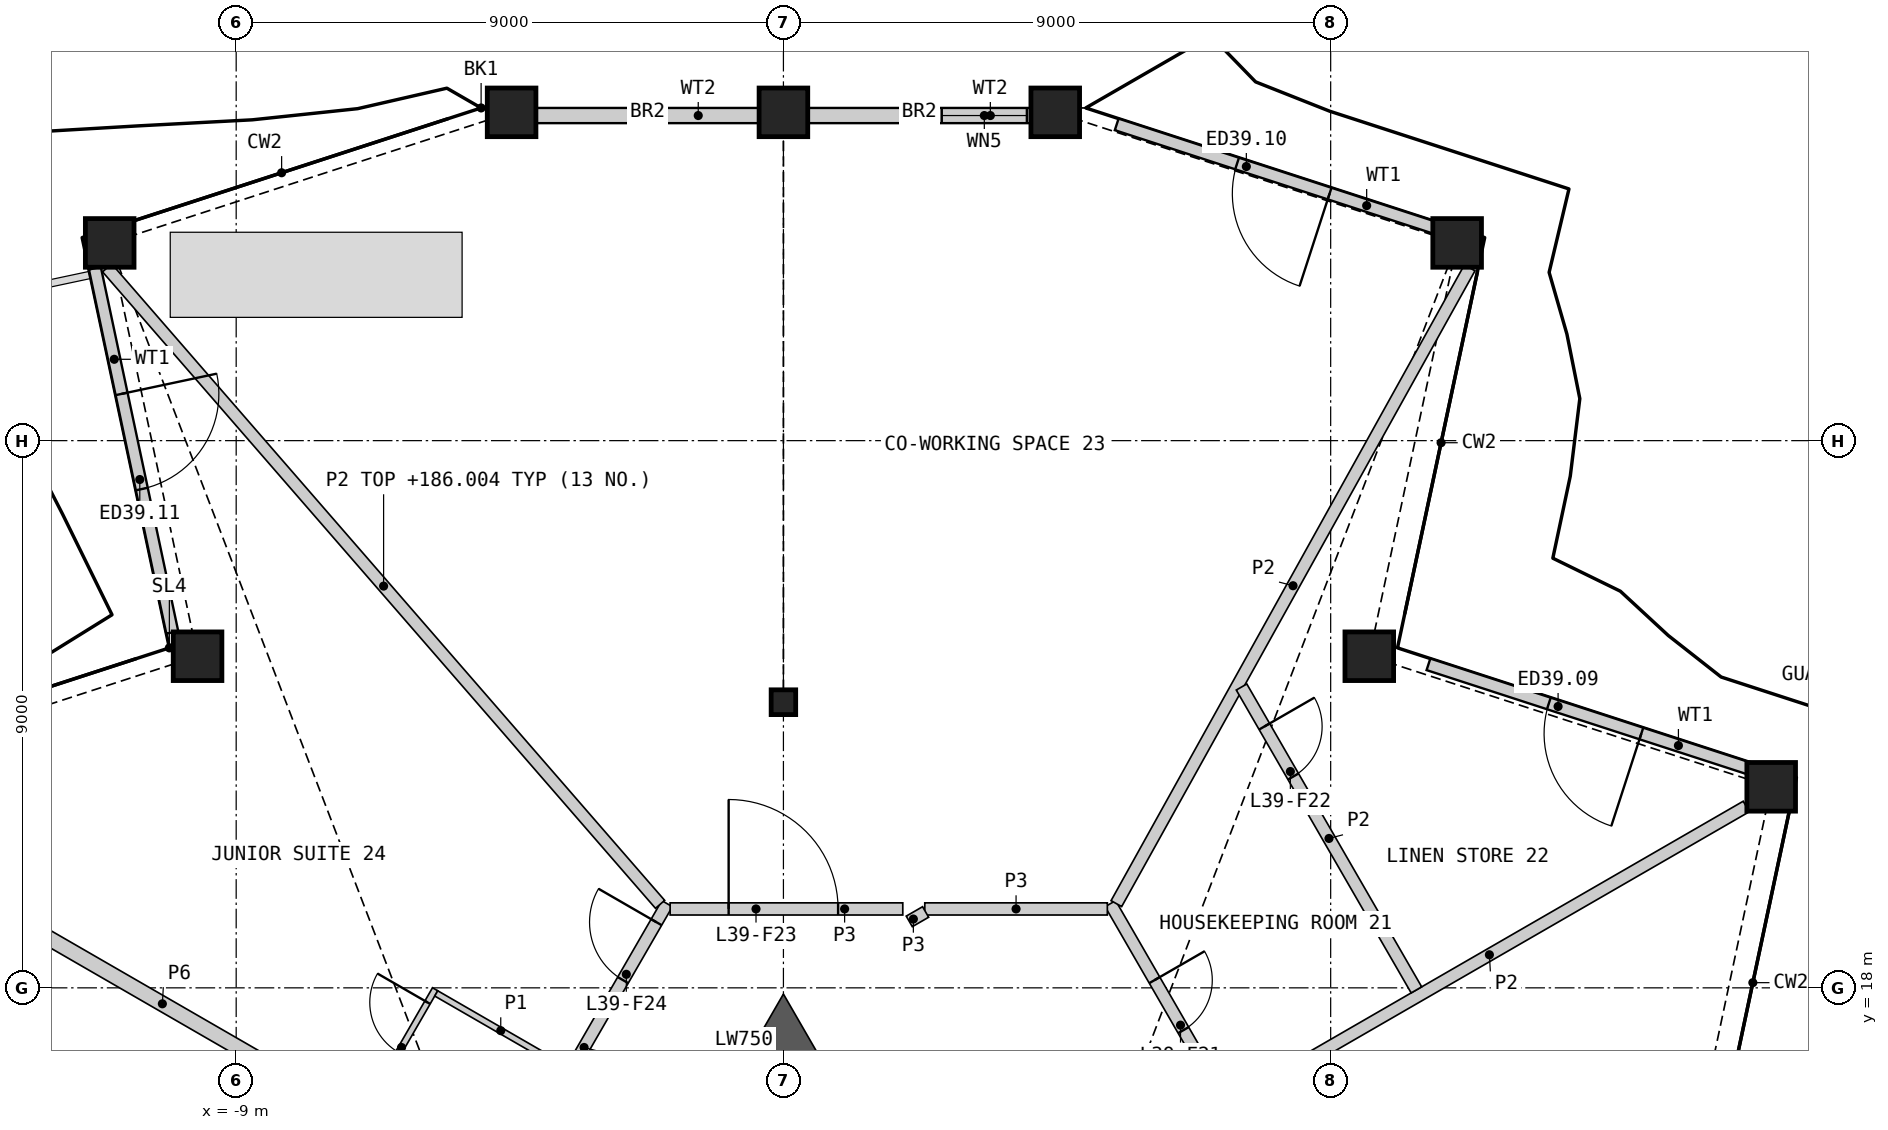
"""IFC4 building model, lengths in metres.
Left out: names, types, materials, properties, quantities, classifications, styles, units other than length and angle.
Written with IfcOpenShell. Run it as: python <this file> out.ifc"""

import sys

from ifc_helpers import new_model, si_unit, direction, frame, frame_2d, origin, origin_2d, place, context, subcontext, project, spatial, polyline, rectangle, hollow_rectangle, i_section, outline, extrude, element, fill, save


model = new_model("IFC4")
c1 = context("Model", 3, precision=1e-05, world=origin(), true_north=direction((0.0, 1.0)))
c2 = subcontext(c1, "Body", "Model", "MODEL_VIEW")
j1 = project(units=[si_unit("LENGTHUNIT", "METRE"), si_unit("PLANEANGLEUNIT", "RADIAN")], contexts=[c1])
p1 = place(None, origin())
s1 = spatial("IfcSite", under=j1, at=p1, CompositionType="ELEMENT")
p2 = place(p1, origin())
s2 = spatial("IfcBuilding", under=s1, at=p2, CompositionType="ELEMENT")
p3 = place(p2, frame((0.0, 0.0, 183.6)))
s3 = spatial("IfcBuildingStorey", under=s2, at=p3, CompositionType="ELEMENT", Elevation=183.6)
for number, where, z_axis, x_axis in (
    (1, (16.245, 21.306, 0.0), (0.0, 0.0, 1.0), (1.0, 0.0, 0.0)),
    (2, (9.635, 23.454, 0.0), (0.0, 0.0, 1.0), (1.0, 0.0, 0.0)),
    (3, (11.08, 30.252, 0.0), (0.0, 0.0, 1.0), (1.0, 0.0, 0.0)),
    (4, (4.47, 32.399, 0.0), (0.0, 0.0, 1.0), (1.0, 0.0, 0.0)),
    (5, (0.0, 32.399, 0.0), (0.0, 0.0, 1.0), (1.0, 0.0, 0.0)),
    (6, (-4.47, 32.399, 0.0), (0.0, 0.0, 1.0), (1.0, 0.0, 0.0)),
    (7, (-11.08, 30.252, 0.0), (0.0, 0.0, 1.0), (1.0, 0.0, 0.0)),
    (8, (-9.635, 23.454, 0.0), (0.0, 0.0, 1.0), (1.0, 0.0, 0.0)),
):
    element("IfcColumn", number, at=place(p3, frame(where, z_axis=z_axis, x_axis=x_axis)), inside=s3, PredefinedType="COLUMN", context=c2, shape_type="SweptSolid", body=[
        extrude(hollow_rectangle(XDim=0.8, YDim=0.8, WallThickness=0.05, at=origin_2d()), origin(), (0.0, 0.0, 1.0), 3.6),
    ])
p4 = place(p3, frame((0.0, 22.698, 0.0), z_axis=(0.0, 0.0, 1.0), x_axis=(1.0, 0.0, 0.0)))
e9 = element("IfcColumn", 9, at=p4, inside=s3, PredefinedType="COLUMN", context=c2, shape_type="SweptSolid", body=[
    extrude(i_section(OverallWidth=0.404, OverallDepth=0.407, WebThickness=0.027, FlangeThickness=0.044, at=origin_2d()), origin(), (0.0, 0.0, 1.0), 3.6),
])
p5 = place(p3, frame((16.089, 21.54, 0.0), z_axis=(0.0, 0.0, 1.0), x_axis=(-0.951053678976, 0.30902572661, 0.0)))
e10 = element("IfcWall", 10, at=p5, inside=s3, PredefinedType="SOLIDWALL", context=c2, shape_type="SweptSolid", body=[
    extrude(rectangle(XDim=5.763, YDim=0.2, at=frame_2d((2.882, 0.0))), origin(), (0.0, 0.0, 1.0), 2.701),
])
p6 = place(p5, frame((2.082, 0.0, 0.0)))
e11 = element("IfcOpeningElement", 11, at=p6, cuts=e10, PredefinedType="OPENING", context=c2, shape_type="SweptSolid", body=[
    extrude(rectangle(XDim=1.6, YDim=2.4, at=frame_2d((0.8, 1.2))), frame((0.0, 0.11, 0.0), z_axis=(0.0, -1.0, 0.0), x_axis=(1.0, 0.0, 0.0)), (0.0, 0.0, 1.0), 0.22),
])
p7 = place(p3, frame((10.962, 30.42, 0.0), z_axis=(0.0, 0.0, 1.0), x_axis=(-0.951062083689, 0.308999859173, 0.0)))
e12 = element("IfcWall", 12, at=p7, inside=s3, PredefinedType="SOLIDWALL", context=c2, shape_type="SweptSolid", body=[
    extrude(rectangle(XDim=5.763, YDim=0.2, at=frame_2d((2.881, 0.0))), origin(), (0.0, 0.0, 1.0), 2.701),
])
p8 = place(p7, frame((2.082, 0.0, 0.0)))
e13 = element("IfcOpeningElement", 13, at=p8, cuts=e12, PredefinedType="OPENING", context=c2, shape_type="SweptSolid", body=[
    extrude(rectangle(XDim=1.6, YDim=2.4, at=frame_2d((0.8, 1.2))), frame((0.0, 0.11, 0.0), z_axis=(0.0, -1.0, 0.0), x_axis=(1.0, 0.0, 0.0)), (0.0, 0.0, 1.0), 0.22),
])
p9 = place(p3, frame((4.404, 32.347, 0.0), z_axis=(0.0, 0.0, 1.0), x_axis=(-1.0, 0.0, 0.0)))
e14 = element("IfcWall", 14, at=p9, inside=s3, PredefinedType="SOLIDWALL", context=c2, shape_type="SweptSolid", body=[
    extrude(rectangle(XDim=4.004, YDim=0.25, at=frame_2d((2.002, 0.0))), origin(), (0.0, 0.0, 1.0), 2.701),
])
p10 = place(p9, frame((0.4, 0.0, 1.6)))
e15 = element("IfcOpeningElement", 15, at=p10, cuts=e14, PredefinedType="OPENING", context=c2, shape_type="SweptSolid", body=[
    extrude(rectangle(XDim=1.4, YDim=0.9, at=frame_2d((0.7, 0.45))), frame((0.0, 0.135, 0.0), z_axis=(0.0, -1.0, 0.0), x_axis=(1.0, 0.0, 0.0)), (0.0, 0.0, 1.0), 0.27),
])
p11 = place(p3, frame((-0.4, 32.347, 0.0), z_axis=(0.0, 0.0, 1.0), x_axis=(-1.0, 0.0, 0.0)))
e16 = element("IfcWall", 16, at=p11, inside=s3, PredefinedType="SOLIDWALL", context=c2, shape_type="SweptSolid", body=[
    extrude(rectangle(XDim=4.004, YDim=0.25, at=frame_2d((2.002, 0.0))), origin(), (0.0, 0.0, 1.0), 2.701),
])
p12 = place(p3, frame((-11.324, 29.835, 0.0), z_axis=(0.0, 0.0, 1.0), x_axis=(0.207925037413, -0.978144763732, 0.0)))
e17 = element("IfcWall", 17, at=p12, inside=s3, PredefinedType="SOLIDWALL", context=c2, shape_type="SweptSolid", body=[
    extrude(rectangle(XDim=6.123, YDim=0.2, at=frame_2d((3.062, 0.0))), origin(), (0.0, 0.0, 1.0), 2.701),
])
p13 = place(p12, frame((2.113, 0.0, 0.0)))
e18 = element("IfcOpeningElement", 18, at=p13, cuts=e17, PredefinedType="OPENING", context=c2, shape_type="SweptSolid", body=[
    extrude(rectangle(XDim=1.6, YDim=2.4, at=frame_2d((0.8, 1.2))), frame((0.0, 0.11, 0.0), z_axis=(0.0, -1.0, 0.0), x_axis=(1.0, 0.0, 0.0)), (0.0, 0.0, 1.0), 0.22),
])
p14 = place(p3, origin())
e19 = element("IfcWall", 19, at=p14, inside=s3, PredefinedType="SHEAR", context=c2, shape_type="SweptSolid", body=[
    extrude(outline(polyline([(-0.649, 16.773), (0.0, 17.898), (0.649, 16.773), (0.0, 16.398), (-0.649, 16.773)])), origin(), (0.0, 0.0, 1.0), 3.25),
])
p15 = place(p3, frame((5.377, 19.385, 0.0), z_axis=(0.0, 0.0, 1.0), x_axis=(0.500000757641, -0.86602496636, 0.0)))
e20 = element("IfcWall", 20, at=p15, inside=s3, PredefinedType="PARTITIONING", context=c2, shape_type="SweptSolid", body=[
    extrude(rectangle(XDim=28.198, YDim=0.2, at=frame_2d((14.099, 0.0))), origin(), (0.0, 0.0, 1.0), 3.25),
])
p16 = place(p15, frame((22.735, 0.0, 0.0)))
e21 = element("IfcOpeningElement", 21, at=p16, cuts=e20, PredefinedType="OPENING", context=c2, shape_type="SweptSolid", body=[
    extrude(rectangle(XDim=1.8, YDim=2.1, at=frame_2d((0.9, 1.05))), frame((0.0, 0.11, 0.0), z_axis=(0.0, -1.0, 0.0), x_axis=(1.0, 0.0, 0.0)), (0.0, 0.0, 1.0), 0.22),
])
p17 = place(p15, frame((14.402, 0.0, 0.0)))
e22 = element("IfcOpeningElement", 22, at=p17, cuts=e20, PredefinedType="OPENING", context=c2, shape_type="SweptSolid", body=[
    extrude(rectangle(XDim=1.0, YDim=2.1, at=frame_2d((0.5, 1.05))), frame((0.0, 0.11, 0.0), z_axis=(0.0, -1.0, 0.0), x_axis=(1.0, 0.0, 0.0)), (0.0, 0.0, 1.0), 0.22),
])
p18 = place(p15, frame((12.796, 0.0, 0.0)))
e23 = element("IfcOpeningElement", 23, at=p18, cuts=e20, PredefinedType="OPENING", context=c2, shape_type="SweptSolid", body=[
    extrude(rectangle(XDim=1.0, YDim=2.1, at=frame_2d((0.5, 1.05))), frame((0.0, 0.11, 0.0), z_axis=(0.0, -1.0, 0.0), x_axis=(1.0, 0.0, 0.0)), (0.0, 0.0, 1.0), 0.22),
])
p19 = place(p15, frame((4.164, 0.0, 0.0)))
e24 = element("IfcOpeningElement", 24, at=p19, cuts=e20, PredefinedType="OPENING", context=c2, shape_type="SweptSolid", body=[
    extrude(rectangle(XDim=1.0, YDim=2.1, at=frame_2d((0.5, 1.05))), frame((0.0, 0.11, 0.0), z_axis=(0.0, -1.0, 0.0), x_axis=(1.0, 0.0, 0.0)), (0.0, 0.0, 1.0), 0.22),
])
p20 = place(p15, frame((1.452, 0.0, 0.0)))
e25 = element("IfcOpeningElement", 25, at=p20, cuts=e20, PredefinedType="OPENING", context=c2, shape_type="SweptSolid", body=[
    extrude(rectangle(XDim=0.95, YDim=2.1, at=frame_2d((0.475, 1.05))), frame((0.0, 0.11, 0.0), z_axis=(0.0, -1.0, 0.0), x_axis=(1.0, 0.0, 0.0)), (0.0, 0.0, 1.0), 0.22),
])
p21 = place(p3, frame((-15.835, 20.983, 0.0), z_axis=(0.0, 0.0, 1.0), x_axis=(0.866022720283, -0.500004647933, 0.0)))
e26 = element("IfcWall", 26, at=p21, inside=s3, PredefinedType="PARTITIONING", context=c2, shape_type="SweptSolid", body=[
    extrude(rectangle(XDim=12.981, YDim=0.25, at=frame_2d((6.49, 0.0))), origin(), (0.0, 0.0, 1.0), 2.404),
])
p22 = place(p3, frame((-4.644, 14.655, 0.0), z_axis=(0.0, 0.0, 1.0), x_axis=(0.49998041698, 0.866036709751, 0.0)))
e27 = element("IfcWall", 27, at=p22, inside=s3, PredefinedType="PARTITIONING", context=c2, shape_type="SweptSolid", body=[
    extrude(rectangle(XDim=5.462, YDim=0.2, at=frame_2d((2.731, 0.0))), origin(), (0.0, 0.0, 1.0), 3.25),
])
p23 = place(p22, frame((4.01, 0.0, 0.0)))
e28 = element("IfcOpeningElement", 28, at=p23, cuts=e27, PredefinedType="OPENING", context=c2, shape_type="SweptSolid", body=[
    extrude(rectangle(XDim=1.1, YDim=2.1, at=frame_2d((0.55, 1.05))), frame((0.0, 0.11, 0.0), z_axis=(0.0, -1.0, 0.0), x_axis=(1.0, 0.0, 0.0)), (0.0, 0.0, 1.0), 0.22),
])
p24 = place(p3, frame((-1.863, 19.298, 0.0), z_axis=(0.0, 0.0, 1.0), x_axis=(1.0, 0.0, 0.0)))
e29 = element("IfcWall", 29, at=p24, inside=s3, PredefinedType="PARTITIONING", context=c2, shape_type="SweptSolid", body=[
    extrude(rectangle(XDim=3.826, YDim=0.2, at=frame_2d((1.913, 0.0))), origin(), (0.0, 0.0, 1.0), 3.25),
])
p25 = place(p24, frame((0.962, 0.0, 0.0)))
e30 = element("IfcOpeningElement", 30, at=p25, cuts=e29, PredefinedType="OPENING", context=c2, shape_type="SweptSolid", body=[
    extrude(rectangle(XDim=1.8, YDim=2.1, at=frame_2d((0.9, 1.05))), frame((0.0, 0.11, 0.0), z_axis=(0.0, -1.0, 0.0), x_axis=(1.0, 0.0, 0.0)), (0.0, 0.0, 1.0), 0.22),
])
p26 = place(p3, frame((2.325, 19.298, 0.0), z_axis=(0.0, 0.0, 1.0), x_axis=(1.0, 0.0, 0.0)))
e31 = element("IfcWall", 31, at=p26, inside=s3, PredefinedType="PARTITIONING", context=c2, shape_type="SweptSolid", body=[
    extrude(rectangle(XDim=3.002, YDim=0.2, at=frame_2d((1.501, 0.0))), origin(), (0.0, 0.0, 1.0), 3.25),
])
p27 = place(p3, frame((2.07, 19.093, 0.0), z_axis=(0.0, 0.0, 1.0), x_axis=(0.866395311824, 0.499358752451, 0.0)))
e32 = element("IfcWall", 32, at=p27, inside=s3, PredefinedType="PARTITIONING", context=c2, shape_type="SweptSolid", body=[
    extrude(rectangle(XDim=0.31, YDim=0.2, at=frame_2d((0.155, 0.0))), origin(), (0.0, 0.0, 1.0), 3.25),
])
p28 = place(p3, frame((-11.122, 29.842, 0.0), z_axis=(0.0, 0.0, 1.0), x_axis=(0.65579678992, -0.754937461205, 0.0)))
e33 = element("IfcWall", 33, at=p28, inside=s3, PredefinedType="PARTITIONING", context=c2, shape_type="SweptSolid", body=[
    extrude(rectangle(XDim=13.867, YDim=0.2, at=frame_2d((6.933, 0.0))), origin(), (0.0, 0.0, 1.0), 2.404),
])
p29 = place(p3, frame((5.476, 19.385, 0.0), z_axis=(0.0, 0.0, 1.0), x_axis=(0.485729569949, 0.874109137853, 0.0)))
e34 = element("IfcWall", 34, at=p29, inside=s3, PredefinedType="PARTITIONING", context=c2, shape_type="SweptSolid", body=[
    extrude(rectangle(XDim=11.962, YDim=0.2, at=frame_2d((5.981, 0.0))), origin(), (0.0, 0.0, 1.0), 2.404),
])
p30 = place(p3, frame((7.386, 16.105, 0.0), z_axis=(0.0, 0.0, 1.0), x_axis=(0.866023056814, 0.500004065051, 0.0)))
e35 = element("IfcWall", 35, at=p30, inside=s3, PredefinedType="PARTITIONING", context=c2, shape_type="SweptSolid", body=[
    extrude(rectangle(XDim=9.756, YDim=0.2, at=frame_2d((4.878, 0.0))), origin(), (0.0, 0.0, 1.0), 2.404),
])
p31 = place(p3, frame((7.534, 22.948, 0.0), z_axis=(0.0, 0.0, 1.0), x_axis=(0.499991885958, -0.866030088378, 0.0)))
e36 = element("IfcWall", 36, at=p31, inside=s3, PredefinedType="PARTITIONING", context=c2, shape_type="SweptSolid", body=[
    extrude(rectangle(XDim=5.752, YDim=0.2, at=frame_2d((2.876, 0.0))), origin(), (0.0, 0.0, 1.0), 2.404),
])
p32 = place(p31, frame((0.75, 0.0, 0.0)))
e37 = element("IfcOpeningElement", 37, at=p32, cuts=e36, PredefinedType="OPENING", context=c2, shape_type="SweptSolid", body=[
    extrude(rectangle(XDim=0.95, YDim=2.1, at=frame_2d((0.475, 1.05))), frame((0.0, 0.11, 0.0), z_axis=(0.0, -1.0, 0.0), x_axis=(1.0, 0.0, 0.0)), (0.0, 0.0, 1.0), 0.22),
])
p33 = place(p3, frame((-8.328, 13.473, 0.0), z_axis=(0.0, 0.0, 1.0), x_axis=(0.499992051641, 0.866029992723, 0.0)))
e38 = element("IfcWall", 38, at=p33, inside=s3, PredefinedType="PARTITIONING", context=c2, shape_type="SweptSolid", body=[
    extrude(rectangle(XDim=5.2, YDim=0.1, at=frame_2d((2.6, 0.0))), origin(), (0.0, 0.0, 1.0), 2.404),
])
p34 = place(p33, frame((4.0, 0.0, 0.0)))
e39 = element("IfcOpeningElement", 39, at=p34, cuts=e38, PredefinedType="OPENING", context=c2, shape_type="SweptSolid", body=[
    extrude(rectangle(XDim=0.95, YDim=2.1, at=frame_2d((0.475, 1.05))), frame((0.0, 0.06, 0.0), z_axis=(0.0, -1.0, 0.0), x_axis=(1.0, 0.0, 0.0)), (0.0, 0.0, 1.0), 0.12),
])
p35 = place(p33, frame((0.25, 0.0, 0.0)))
e40 = element("IfcOpeningElement", 40, at=p35, cuts=e38, PredefinedType="OPENING", context=c2, shape_type="SweptSolid", body=[
    extrude(rectangle(XDim=0.95, YDim=2.1, at=frame_2d((0.475, 1.05))), frame((0.0, 0.06, 0.0), z_axis=(0.0, -1.0, 0.0), x_axis=(1.0, 0.0, 0.0)), (0.0, 0.0, 1.0), 0.12),
])
p36 = place(p3, frame((-5.71, 17.908, 0.0), z_axis=(0.0, 0.0, 1.0), x_axis=(0.866057815567, -0.499943856944, 0.0)))
e41 = element("IfcWall", 41, at=p36, inside=s3, PredefinedType="PARTITIONING", context=c2, shape_type="SweptSolid", body=[
    extrude(rectangle(XDim=2.45, YDim=0.1, at=frame_2d((1.225, 0.0))), origin(), (0.0, 0.0, 1.0), 2.404),
])
p37 = place(p6, origin())
e42 = element("IfcDoor", 42, at=p37, inside=s3, OperationType="DOUBLE_DOOR_SINGLE_SWING", PredefinedType="DOOR", context=c2, shape_type="SweptSolid", body=[
    extrude(rectangle(XDim=1.6, YDim=2.4, at=frame_2d((0.8, 1.2))), frame((0.0, 0.025, 0.0), z_axis=(0.0, -1.0, 0.0), x_axis=(1.0, 0.0, 0.0)), (0.0, 0.0, 1.0), 0.05),
])
fill(e11, e42)
p38 = place(p8, origin())
e43 = element("IfcDoor", 43, at=p38, inside=s3, OperationType="DOUBLE_DOOR_SINGLE_SWING", PredefinedType="DOOR", context=c2, shape_type="SweptSolid", body=[
    extrude(rectangle(XDim=1.6, YDim=2.4, at=frame_2d((0.8, 1.2))), frame((0.0, 0.025, 0.0), z_axis=(0.0, -1.0, 0.0), x_axis=(1.0, 0.0, 0.0)), (0.0, 0.0, 1.0), 0.05),
])
fill(e13, e43)
p39 = place(p10, origin())
e44 = element("IfcWindow", 44, at=p39, inside=s3, PartitioningType="SINGLE_PANEL", PredefinedType="WINDOW", context=c2, shape_type="SweptSolid", body=[
    extrude(rectangle(XDim=1.4, YDim=0.9, at=frame_2d((0.7, 0.45))), frame((0.0, 0.03, 0.0), z_axis=(0.0, -1.0, 0.0), x_axis=(1.0, 0.0, 0.0)), (0.0, 0.0, 1.0), 0.06),
])
fill(e15, e44)
p40 = place(p13, origin())
e45 = element("IfcDoor", 45, at=p40, inside=s3, OperationType="DOUBLE_DOOR_SINGLE_SWING", PredefinedType="DOOR", context=c2, shape_type="SweptSolid", body=[
    extrude(rectangle(XDim=1.6, YDim=2.4, at=frame_2d((0.8, 1.2))), frame((0.0, 0.025, 0.0), z_axis=(0.0, -1.0, 0.0), x_axis=(1.0, 0.0, 0.0)), (0.0, 0.0, 1.0), 0.05),
])
fill(e18, e45)
p41 = place(p20, origin())
e46 = element("IfcDoor", 46, at=p41, inside=s3, OperationType="SINGLE_SWING_LEFT", PredefinedType="DOOR", context=c2, shape_type="SweptSolid", body=[
    extrude(rectangle(XDim=0.95, YDim=2.1, at=frame_2d((0.475, 1.05))), frame((0.0, 0.025, 0.0), z_axis=(0.0, -1.0, 0.0), x_axis=(1.0, 0.0, 0.0)), (0.0, 0.0, 1.0), 0.05),
])
fill(e25, e46)
p42 = place(p32, origin())
e47 = element("IfcDoor", 47, at=p42, inside=s3, OperationType="SINGLE_SWING_LEFT", PredefinedType="DOOR", context=c2, shape_type="SweptSolid", body=[
    extrude(rectangle(XDim=0.95, YDim=2.1, at=frame_2d((0.475, 1.05))), frame((0.0, 0.025, 0.0), z_axis=(0.0, -1.0, 0.0), x_axis=(1.0, 0.0, 0.0)), (0.0, 0.0, 1.0), 0.05),
])
fill(e37, e47)
p43 = place(p25, origin())
e48 = element("IfcDoor", 48, at=p43, inside=s3, OperationType="DOUBLE_DOOR_SINGLE_SWING", PredefinedType="DOOR", context=c2, shape_type="SweptSolid", body=[
    extrude(rectangle(XDim=1.8, YDim=2.1, at=frame_2d((0.9, 1.05))), frame((0.0, 0.025, 0.0), z_axis=(0.0, -1.0, 0.0), x_axis=(1.0, 0.0, 0.0)), (0.0, 0.0, 1.0), 0.05),
])
fill(e30, e48)
p44 = place(p23, origin())
e49 = element("IfcDoor", 49, at=p44, inside=s3, OperationType="SINGLE_SWING_RIGHT", PredefinedType="DOOR", context=c2, shape_type="SweptSolid", body=[
    extrude(rectangle(XDim=1.1, YDim=2.1, at=frame_2d((0.55, 1.05))), frame((0.0, 0.025, 0.0), z_axis=(0.0, -1.0, 0.0), x_axis=(1.0, 0.0, 0.0)), (0.0, 0.0, 1.0), 0.05),
])
fill(e28, e49)
p45 = place(p34, origin())
e50 = element("IfcDoor", 50, at=p45, inside=s3, OperationType="SINGLE_SWING_RIGHT", PredefinedType="DOOR", context=c2, shape_type="SweptSolid", body=[
    extrude(rectangle(XDim=0.95, YDim=2.1, at=frame_2d((0.475, 1.05))), frame((0.0, 0.025, 0.0), z_axis=(0.0, -1.0, 0.0), x_axis=(1.0, 0.0, 0.0)), (0.0, 0.0, 1.0), 0.05),
])
fill(e39, e50)
save(model, sys.argv[1])
